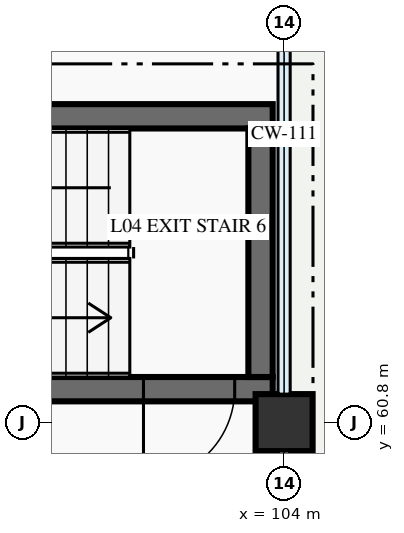
"""IFC4 building model, lengths in metres.
Left out: names, types, materials, properties, quantities, classifications, styles, units other than length and angle.
Written with IfcOpenShell. Run it as: python <this file> out.ifc"""

import sys

from ifc_helpers import new_model, si_unit, direction, frame, frame_2d, origin, origin_2d, place, context, subcontext, project, spatial, rectangle, extrude, element, fill, save


model = new_model("IFC4")
c1 = context("Model", 3, precision=1e-05, world=origin(), true_north=direction((0.0, 1.0)))
c2 = subcontext(c1, "Body", "Model", "MODEL_VIEW")
j1 = project(units=[si_unit("LENGTHUNIT", "METRE"), si_unit("PLANEANGLEUNIT", "RADIAN")], contexts=[c1])
p1 = place(None, origin())
s1 = spatial("IfcSite", under=j1, at=p1, CompositionType="ELEMENT")
p2 = place(p1, origin())
s2 = spatial("IfcBuilding", under=s1, at=p2, CompositionType="ELEMENT")
p3 = place(p2, frame((0.0, 0.0, 14.7)))
s3 = spatial("IfcBuildingStorey", under=s2, at=p3, CompositionType="ELEMENT", Elevation=14.7)
p4 = place(p3, frame((104.0, 60.8, 0.0), z_axis=(0.0, 0.0, 1.0), x_axis=(1.0, 0.0, 0.0)))
e1 = element("IfcColumn", 1, at=p4, inside=s3, PredefinedType="COLUMN", context=c2, shape_type="SweptSolid", body=[
    extrude(rectangle(XDim=0.75, YDim=0.75, at=origin_2d()), origin(), (0.0, 0.0, 1.0), 4.2),
])
p5 = place(p3, frame((103.85, 61.24, 0.0), z_axis=(0.0, 0.0, 1.0), x_axis=(-1.0, 0.0, 0.0)))
e2 = element("IfcWall", 2, at=p5, inside=s3, PredefinedType="SHEAR", context=c2, shape_type="SweptSolid", body=[
    extrude(rectangle(XDim=7.7, YDim=0.32, at=frame_2d((3.85, 0.0))), origin(), (0.0, 0.0, 1.0), 4.2),
])
p6 = place(p5, frame((0.5, 0.0, 0.0)))
e3 = element("IfcOpeningElement", 3, at=p6, cuts=e2, PredefinedType="OPENING", context=c2, shape_type="SweptSolid", body=[
    extrude(rectangle(XDim=1.2, YDim=2.2, at=frame_2d((0.6, 1.1))), frame((0.0, 0.17, 0.0), z_axis=(0.0, -1.0, 0.0), x_axis=(1.0, 0.0, 0.0)), (0.0, 0.0, 1.0), 0.34),
])
p7 = place(p3, frame((96.15, 64.83, 0.0), z_axis=(0.0, 0.0, 1.0), x_axis=(1.0, 0.0, 0.0)))
e4 = element("IfcWall", 4, at=p7, inside=s3, PredefinedType="SHEAR", context=c2, shape_type="SweptSolid", body=[
    extrude(rectangle(XDim=7.7, YDim=0.32, at=frame_2d((3.85, 0.0))), origin(), (0.0, 0.0, 1.0), 4.2),
])
p8 = place(p3, frame((103.69, 64.67, 0.0), z_axis=(0.0, 0.0, 1.0), x_axis=(0.0, -1.0, 0.0)))
e5 = element("IfcWall", 5, at=p8, inside=s3, PredefinedType="SHEAR", context=c2, shape_type="SweptSolid", body=[
    extrude(rectangle(XDim=3.27, YDim=0.32, at=frame_2d((1.635, 0.0))), origin(), (0.0, 0.0, 1.0), 4.2),
])
p9 = place(p6, origin())
e6 = element("IfcDoor", 6, at=p9, inside=s3, OperationType="SINGLE_SWING_RIGHT", PredefinedType="DOOR", context=c2, shape_type="SweptSolid", body=[
    extrude(rectangle(XDim=1.2, YDim=2.2, at=frame_2d((0.6, 1.1))), frame((0.0, 0.025, 0.0), z_axis=(0.0, -1.0, 0.0), x_axis=(1.0, 0.0, 0.0)), (0.0, 0.0, 1.0), 0.05),
])
fill(e3, e6)
save(model, sys.argv[1])
